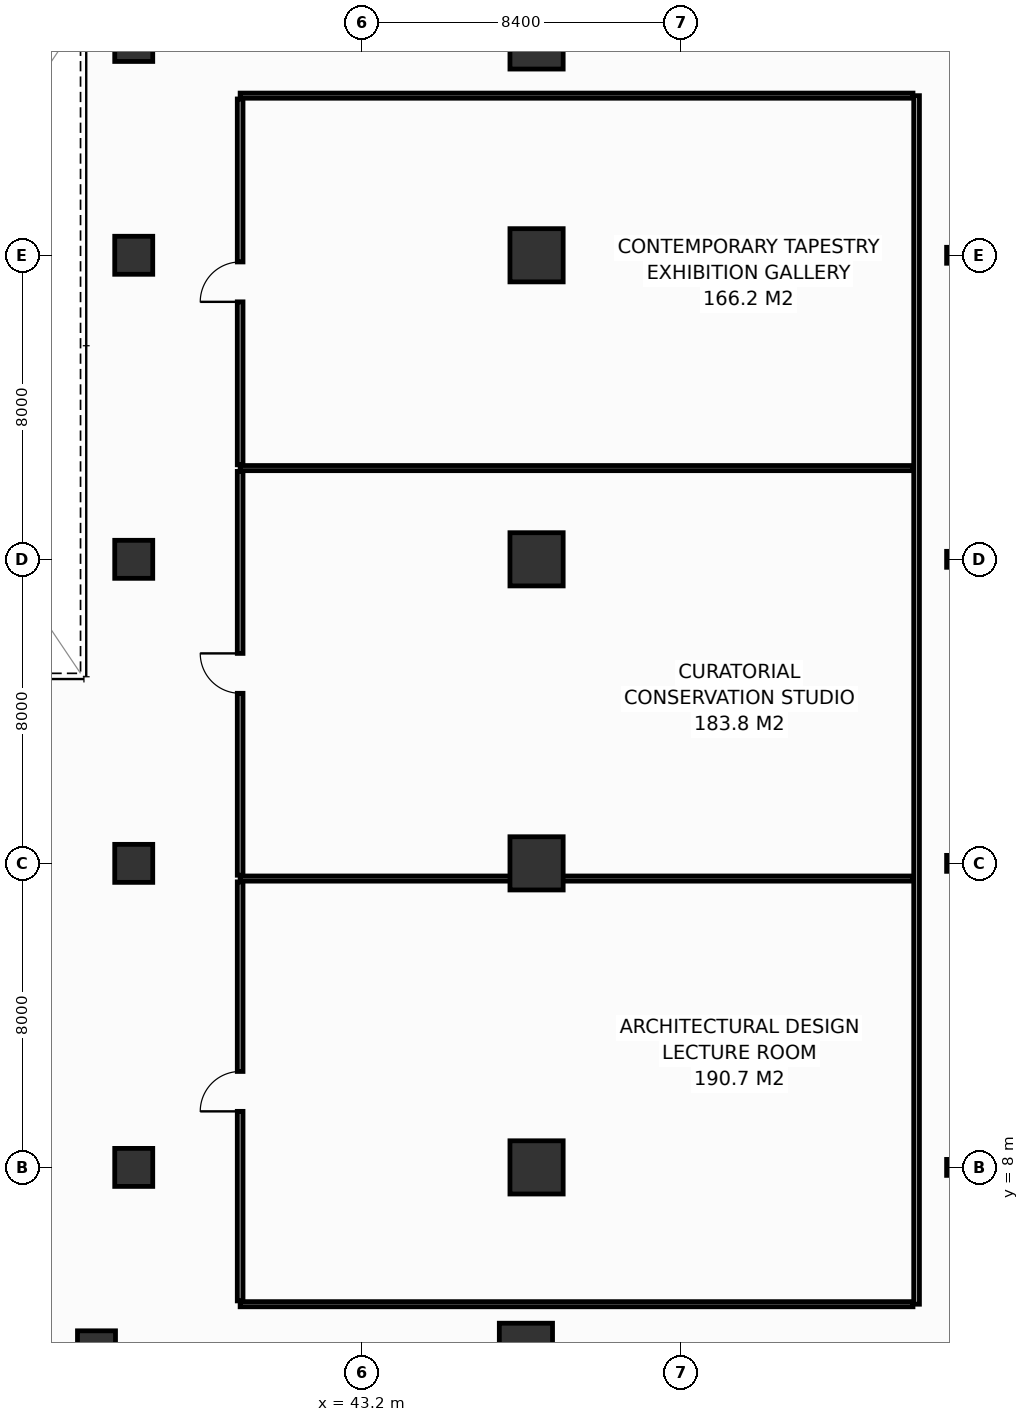
"""IFC4 building model, lengths in metres.
Left out: names, types, materials, properties, quantities, classifications, styles, units other than length and angle.
Written with IfcOpenShell. Run it as: python <this file> out.ifc"""

import sys

from ifc_helpers import new_model, si_unit, direction, frame, frame_2d, origin, origin_2d, place, context, subcontext, project, spatial, rectangle, hollow_rectangle, i_section, extrude, element, fill, save


model = new_model("IFC4")
c1 = context("Model", 3, precision=1e-05, world=origin(), true_north=direction((0.0, 1.0)))
c2 = subcontext(c1, "Body", "Model", "MODEL_VIEW")
j1 = project(units=[si_unit("LENGTHUNIT", "METRE"), si_unit("PLANEANGLEUNIT", "RADIAN")], contexts=[c1])
p1 = place(None, origin())
s1 = spatial("IfcSite", under=j1, at=p1, CompositionType="ELEMENT")
p2 = place(p1, origin())
s2 = spatial("IfcBuilding", under=s1, at=p2, CompositionType="ELEMENT")
p3 = place(p2, frame((0.0, 0.0, 22.2)))
s3 = spatial("IfcBuildingStorey", under=s2, at=p3, CompositionType="ELEMENT", Elevation=22.2)
p4 = place(p3, frame((36.22, 3.2, 0.0), z_axis=(0.0, 0.0, 1.0), x_axis=(1.0, 0.0, 0.0)))
e1 = element("IfcColumn", 1, at=p4, inside=s3, PredefinedType="COLUMN", context=c2, shape_type="SweptSolid", body=[
    extrude(hollow_rectangle(XDim=1.0, YDim=1.0, WallThickness=0.045, at=origin_2d()), origin(), (0.0, 0.0, 1.0), 5.4),
])
p5 = place(p3, frame((47.52, 3.2, 0.0), z_axis=(0.0, 0.0, 1.0), x_axis=(1.0, 0.0, 0.0)))
e2 = element("IfcColumn", 2, at=p5, inside=s3, PredefinedType="COLUMN", context=c2, shape_type="SweptSolid", body=[
    extrude(hollow_rectangle(XDim=1.4, YDim=1.4, WallThickness=0.065, at=origin_2d()), origin(), (0.0, 0.0, 1.0), 5.4),
])
p6 = place(p3, frame((37.2, 8.0, 0.0), z_axis=(0.0, 0.0, 1.0), x_axis=(1.0, 0.0, 0.0)))
e3 = element("IfcColumn", 3, at=p6, inside=s3, PredefinedType="COLUMN", context=c2, shape_type="SweptSolid", body=[
    extrude(hollow_rectangle(XDim=1.0, YDim=1.0, WallThickness=0.045, at=origin_2d()), origin(), (0.0, 0.0, 1.0), 5.4),
])
p7 = place(p3, frame((47.8, 8.0, 0.0), z_axis=(0.0, 0.0, 1.0), x_axis=(1.0, 0.0, 0.0)))
e4 = element("IfcColumn", 4, at=p7, inside=s3, PredefinedType="COLUMN", context=c2, shape_type="SweptSolid", body=[
    extrude(hollow_rectangle(XDim=1.4, YDim=1.4, WallThickness=0.065, at=origin_2d()), origin(), (0.0, 0.0, 1.0), 5.4),
])
p8 = place(p3, frame((37.2, 16.0, 0.0), z_axis=(0.0, 0.0, 1.0), x_axis=(1.0, 0.0, 0.0)))
e5 = element("IfcColumn", 5, at=p8, inside=s3, PredefinedType="COLUMN", context=c2, shape_type="SweptSolid", body=[
    extrude(hollow_rectangle(XDim=1.0, YDim=1.0, WallThickness=0.045, at=origin_2d()), origin(), (0.0, 0.0, 1.0), 5.4),
])
p9 = place(p3, frame((47.8, 16.0, 0.0), z_axis=(0.0, 0.0, 1.0), x_axis=(1.0, 0.0, 0.0)))
e6 = element("IfcColumn", 6, at=p9, inside=s3, PredefinedType="COLUMN", context=c2, shape_type="SweptSolid", body=[
    extrude(hollow_rectangle(XDim=1.4, YDim=1.4, WallThickness=0.065, at=origin_2d()), origin(), (0.0, 0.0, 1.0), 5.4),
])
p10 = place(p3, frame((37.2, 24.0, 0.0), z_axis=(0.0, 0.0, 1.0), x_axis=(1.0, 0.0, 0.0)))
e7 = element("IfcColumn", 7, at=p10, inside=s3, PredefinedType="COLUMN", context=c2, shape_type="SweptSolid", body=[
    extrude(hollow_rectangle(XDim=1.0, YDim=1.0, WallThickness=0.045, at=origin_2d()), origin(), (0.0, 0.0, 1.0), 5.4),
])
p11 = place(p3, frame((47.8, 24.0, 0.0), z_axis=(0.0, 0.0, 1.0), x_axis=(1.0, 0.0, 0.0)))
e8 = element("IfcColumn", 8, at=p11, inside=s3, PredefinedType="COLUMN", context=c2, shape_type="SweptSolid", body=[
    extrude(hollow_rectangle(XDim=1.4, YDim=1.4, WallThickness=0.065, at=origin_2d()), origin(), (0.0, 0.0, 1.0), 5.4),
])
p12 = place(p3, frame((37.2, 32.0, 0.0), z_axis=(0.0, 0.0, 1.0), x_axis=(1.0, 0.0, 0.0)))
e9 = element("IfcColumn", 9, at=p12, inside=s3, PredefinedType="COLUMN", context=c2, shape_type="SweptSolid", body=[
    extrude(hollow_rectangle(XDim=1.0, YDim=1.0, WallThickness=0.045, at=origin_2d()), origin(), (0.0, 0.0, 1.0), 5.4),
])
p13 = place(p3, frame((47.8, 32.0, 0.0), z_axis=(0.0, 0.0, 1.0), x_axis=(1.0, 0.0, 0.0)))
e10 = element("IfcColumn", 10, at=p13, inside=s3, PredefinedType="COLUMN", context=c2, shape_type="SweptSolid", body=[
    extrude(hollow_rectangle(XDim=1.4, YDim=1.4, WallThickness=0.065, at=origin_2d()), origin(), (0.0, 0.0, 1.0), 5.4),
])
p14 = place(p3, frame((37.2, 37.6, 0.0), z_axis=(0.0, 0.0, 1.0), x_axis=(1.0, 0.0, 0.0)))
e11 = element("IfcColumn", 11, at=p14, inside=s3, PredefinedType="COLUMN", context=c2, shape_type="SweptSolid", body=[
    extrude(hollow_rectangle(XDim=1.0, YDim=1.0, WallThickness=0.045, at=origin_2d()), origin(), (0.0, 0.0, 1.0), 5.4),
])
p15 = place(p3, frame((47.8, 37.6, 0.0), z_axis=(0.0, 0.0, 1.0), x_axis=(1.0, 0.0, 0.0)))
e12 = element("IfcColumn", 12, at=p15, inside=s3, PredefinedType="COLUMN", context=c2, shape_type="SweptSolid", body=[
    extrude(hollow_rectangle(XDim=1.4, YDim=1.4, WallThickness=0.065, at=origin_2d()), origin(), (0.0, 0.0, 1.0), 5.4),
])
for number, where, z_axis, x_axis in (
    (13, (58.8, 8.0, 0.0), (0.0, 0.0, 1.0), (1.0, 0.0, 0.0)),
    (14, (58.8, 16.0, 0.0), (0.0, 0.0, 1.0), (1.0, 0.0, 0.0)),
    (15, (58.8, 24.0, 0.0), (0.0, 0.0, 1.0), (1.0, 0.0, 0.0)),
    (16, (58.8, 32.0, 0.0), (0.0, 0.0, 1.0), (1.0, 0.0, 0.0)),
):
    element("IfcColumn", number, at=place(p3, frame(where, z_axis=z_axis, x_axis=x_axis)), inside=s3, PredefinedType="COLUMN", context=c2, shape_type="SweptSolid", body=[
        extrude(i_section(OverallWidth=0.42, OverallDepth=0.42, WebThickness=0.02, FlangeThickness=0.035, FilletRadius=0.022, at=origin_2d()), origin(), (0.0, 0.0, 1.0), 5.4),
    ])
p16 = place(p3, frame((57.8, 4.4, 0.0), z_axis=(0.0, 0.0, 1.0), x_axis=(0.0, 1.0, 0.0)))
e17 = element("IfcWall", 17, at=p16, inside=s3, PredefinedType="PARTITIONING", context=c2, shape_type="SweptSolid", body=[
    extrude(rectangle(XDim=31.8, YDim=0.15, at=frame_2d((15.9, 0.0))), origin(), (0.0, 0.0, 1.0), 4.235),
])
for number, where, z_axis, x_axis in (
    (18, (40.0, 4.4, 0.0), (0.0, 0.0, 1.0), (1.0, 0.0, 0.0)),
    (19, (40.0, 15.6, 0.0), (0.0, 0.0, 1.0), (1.0, 0.0, 0.0)),
    (20, (40.0, 26.4, 0.0), (0.0, 0.0, 1.0), (1.0, 0.0, 0.0)),
    (21, (40.0, 36.2, 0.0), (0.0, 0.0, 1.0), (1.0, 0.0, 0.0)),
):
    element("IfcWall", number, at=place(p3, frame(where, z_axis=z_axis, x_axis=x_axis)), inside=s3, PredefinedType="PARTITIONING", context=c2, shape_type="SweptSolid", body=[
        extrude(rectangle(XDim=17.705, YDim=0.135, at=frame_2d((8.853, 0.0))), origin(), (0.0, 0.0, 1.0), 4.235),
    ])
p17 = place(p3, frame((40.0, 4.488, 0.0), z_axis=(0.0, 0.0, 1.0), x_axis=(0.0, 1.0, 0.0)))
e22 = element("IfcWall", 22, at=p17, inside=s3, PredefinedType="PARTITIONING", context=c2, shape_type="SweptSolid", body=[
    extrude(rectangle(XDim=11.025, YDim=0.15, at=frame_2d((5.512, 0.0))), origin(), (0.0, 0.0, 1.0), 4.235),
])
p18 = place(p17, frame((4.987, 0.0, 0.0)))
e23 = element("IfcOpeningElement", 23, at=p18, cuts=e22, PredefinedType="OPENING", context=c2, shape_type="SweptSolid", body=[
    extrude(rectangle(XDim=1.05, YDim=2.15, at=frame_2d((0.525, 1.075))), frame((0.0, 0.085, 0.0), z_axis=(0.0, -1.0, 0.0), x_axis=(1.0, 0.0, 0.0)), (0.0, 0.0, 1.0), 0.17),
])
p19 = place(p3, frame((40.0, 15.688, 0.0), z_axis=(0.0, 0.0, 1.0), x_axis=(0.0, 1.0, 0.0)))
e24 = element("IfcWall", 24, at=p19, inside=s3, PredefinedType="PARTITIONING", context=c2, shape_type="SweptSolid", body=[
    extrude(rectangle(XDim=10.625, YDim=0.15, at=frame_2d((5.312, 0.0))), origin(), (0.0, 0.0, 1.0), 4.235),
])
p20 = place(p19, frame((4.787, 0.0, 0.0)))
e25 = element("IfcOpeningElement", 25, at=p20, cuts=e24, PredefinedType="OPENING", context=c2, shape_type="SweptSolid", body=[
    extrude(rectangle(XDim=1.05, YDim=2.15, at=frame_2d((0.525, 1.075))), frame((0.0, 0.085, 0.0), z_axis=(0.0, -1.0, 0.0), x_axis=(1.0, 0.0, 0.0)), (0.0, 0.0, 1.0), 0.17),
])
p21 = place(p3, frame((40.0, 26.488, 0.0), z_axis=(0.0, 0.0, 1.0), x_axis=(0.0, 1.0, 0.0)))
e26 = element("IfcWall", 26, at=p21, inside=s3, PredefinedType="PARTITIONING", context=c2, shape_type="SweptSolid", body=[
    extrude(rectangle(XDim=9.625, YDim=0.15, at=frame_2d((4.812, 0.0))), origin(), (0.0, 0.0, 1.0), 4.235),
])
p22 = place(p21, frame((4.287, 0.0, 0.0)))
e27 = element("IfcOpeningElement", 27, at=p22, cuts=e26, PredefinedType="OPENING", context=c2, shape_type="SweptSolid", body=[
    extrude(rectangle(XDim=1.05, YDim=2.15, at=frame_2d((0.525, 1.075))), frame((0.0, 0.085, 0.0), z_axis=(0.0, -1.0, 0.0), x_axis=(1.0, 0.0, 0.0)), (0.0, 0.0, 1.0), 0.17),
])
p23 = place(p18, origin())
e28 = element("IfcDoor", 28, at=p23, inside=s3, OperationType="SINGLE_SWING_LEFT", PredefinedType="DOOR", context=c2, shape_type="SweptSolid", body=[
    extrude(rectangle(XDim=1.05, YDim=2.15, at=frame_2d((0.525, 1.075))), frame((0.0, 0.025, 0.0), z_axis=(0.0, -1.0, 0.0), x_axis=(1.0, 0.0, 0.0)), (0.0, 0.0, 1.0), 0.05),
])
fill(e23, e28)
p24 = place(p20, origin())
e29 = element("IfcDoor", 29, at=p24, inside=s3, OperationType="SINGLE_SWING_RIGHT", PredefinedType="DOOR", context=c2, shape_type="SweptSolid", body=[
    extrude(rectangle(XDim=1.05, YDim=2.15, at=frame_2d((0.525, 1.075))), frame((0.0, 0.025, 0.0), z_axis=(0.0, -1.0, 0.0), x_axis=(1.0, 0.0, 0.0)), (0.0, 0.0, 1.0), 0.05),
])
fill(e25, e29)
p25 = place(p22, origin())
e30 = element("IfcDoor", 30, at=p25, inside=s3, OperationType="SINGLE_SWING_LEFT", PredefinedType="DOOR", context=c2, shape_type="SweptSolid", body=[
    extrude(rectangle(XDim=1.05, YDim=2.15, at=frame_2d((0.525, 1.075))), frame((0.0, 0.025, 0.0), z_axis=(0.0, -1.0, 0.0), x_axis=(1.0, 0.0, 0.0)), (0.0, 0.0, 1.0), 0.05),
])
fill(e27, e30)
save(model, sys.argv[1])
